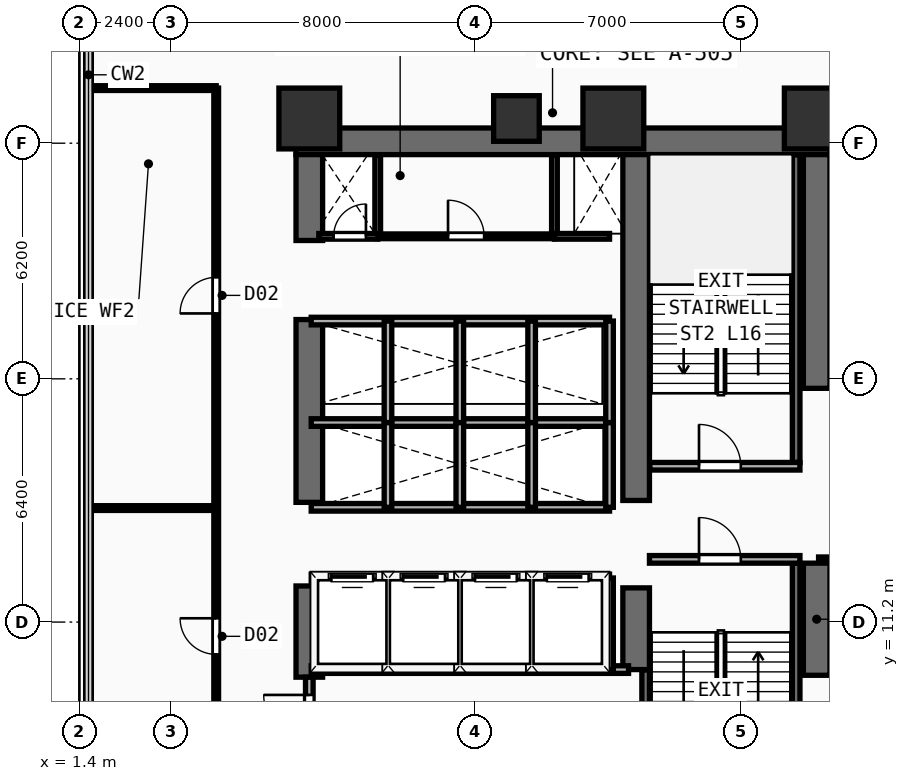
"""IFC4 building model, lengths in metres.
Left out: names, types, materials, properties, quantities, classifications, styles, units other than length and angle.
Written with IfcOpenShell. Run it as: python <this file> out.ifc"""

import sys

from ifc_helpers import new_model, si_unit, direction, frame, frame_2d, origin, origin_2d, place, context, subcontext, project, spatial, rectangle, extrude, element, fill, save


model = new_model("IFC4")
c1 = context("Model", 3, precision=1e-05, world=origin(), true_north=direction((0.0, 1.0)))
c2 = subcontext(c1, "Body", "Model", "MODEL_VIEW")
j1 = project(units=[si_unit("LENGTHUNIT", "METRE"), si_unit("PLANEANGLEUNIT", "RADIAN")], contexts=[c1])
p1 = place(None, origin())
s1 = spatial("IfcSite", under=j1, at=p1, CompositionType="ELEMENT")
p2 = place(p1, origin())
s2 = spatial("IfcBuilding", under=s1, at=p2, CompositionType="ELEMENT")
p3 = place(p2, frame((0.0, 0.0, 63.8)))
s3 = spatial("IfcBuildingStorey", under=s2, at=p3, CompositionType="ELEMENT", Elevation=63.8)
p4 = place(p3, frame((7.1, 23.85, 0.0), z_axis=(0.0, 0.0, 1.0), x_axis=(1.0, 0.0, 0.0)))
e1 = element("IfcWall", 1, at=p4, inside=s3, PredefinedType="SHEAR", context=c2, shape_type="SweptSolid", body=[
    extrude(rectangle(XDim=14.05, YDim=0.7, at=frame_2d((7.025, 0.0))), origin(), (0.0, 0.0, 1.0), 3.54),
])
p5 = place(p3, frame((7.45, 9.75, 0.0), z_axis=(0.0, 0.0, 1.0), x_axis=(0.0, 1.0, 0.0)))
e2 = element("IfcWall", 2, at=p5, inside=s3, PredefinedType="SHEAR", context=c2, shape_type="SweptSolid", body=[
    extrude(rectangle(XDim=2.4, YDim=0.7, at=frame_2d((1.2, 0.0))), origin(), (0.0, 0.0, 1.0), 3.54),
])
p6 = place(p3, frame((7.45, 14.35, 0.0), z_axis=(0.0, 0.0, 1.0), x_axis=(0.0, 1.0, 0.0)))
e3 = element("IfcWall", 3, at=p6, inside=s3, PredefinedType="SHEAR", context=c2, shape_type="SweptSolid", body=[
    extrude(rectangle(XDim=4.81, YDim=0.7, at=frame_2d((2.405, 0.0))), origin(), (0.0, 0.0, 1.0), 3.54),
])
p7 = place(p3, frame((7.45, 21.24, 0.0), z_axis=(0.0, 0.0, 1.0), x_axis=(0.0, 1.0, 0.0)))
e4 = element("IfcWall", 4, at=p7, inside=s3, PredefinedType="SHEAR", context=c2, shape_type="SweptSolid", body=[
    extrude(rectangle(XDim=2.26, YDim=0.7, at=frame_2d((1.13, 0.0))), origin(), (0.0, 0.0, 1.0), 3.54),
])
p8 = place(p3, frame((20.8, 9.8, 0.0), z_axis=(0.0, 0.0, 1.0), x_axis=(0.0, 1.0, 0.0)))
e5 = element("IfcWall", 5, at=p8, inside=s3, PredefinedType="SHEAR", context=c2, shape_type="SweptSolid", body=[
    extrude(rectangle(XDim=2.95, YDim=0.7, at=frame_2d((1.475, 0.0))), origin(), (0.0, 0.0, 1.0), 3.54),
])
p9 = place(p3, frame((20.8, 17.35, 0.0), z_axis=(0.0, 0.0, 1.0), x_axis=(0.0, 1.0, 0.0)))
e6 = element("IfcWall", 6, at=p9, inside=s3, PredefinedType="SHEAR", context=c2, shape_type="SweptSolid", body=[
    extrude(rectangle(XDim=6.15, YDim=0.7, at=frame_2d((3.075, 0.0))), origin(), (0.0, 0.0, 1.0), 3.54),
])
p10 = place(p3, frame((16.05, 9.95, 0.0), z_axis=(0.0, 0.0, 1.0), x_axis=(0.0, 1.0, 0.0)))
e7 = element("IfcWall", 7, at=p10, inside=s3, PredefinedType="SHEAR", context=c2, shape_type="SweptSolid", body=[
    extrude(rectangle(XDim=2.15, YDim=0.7, at=frame_2d((1.075, 0.0))), origin(), (0.0, 0.0, 1.0), 3.54),
])
p11 = place(p3, frame((16.05, 14.4, 0.0), z_axis=(0.0, 0.0, 1.0), x_axis=(0.0, 1.0, 0.0)))
e8 = element("IfcWall", 8, at=p11, inside=s3, PredefinedType="SHEAR", context=c2, shape_type="SweptSolid", body=[
    extrude(rectangle(XDim=9.1, YDim=0.7, at=frame_2d((4.55, 0.0))), origin(), (0.0, 0.0, 1.0), 3.54),
])
for number, where, z_axis, x_axis in (
    (9, (7.45, 24.45, 0.0), (0.0, 0.0, 1.0), (1.0, 0.0, 0.0)),
    (10, (15.45, 24.45, 0.0), (0.0, 0.0, 1.0), (1.0, 0.0, 0.0)),
    (11, (20.75, 24.45, 0.0), (0.0, 0.0, 1.0), (1.0, 0.0, 0.0)),
):
    element("IfcColumn", number, at=place(p3, frame(where, z_axis=z_axis, x_axis=x_axis)), inside=s3, PredefinedType="COLUMN", context=c2, shape_type="SweptSolid", body=[
        extrude(rectangle(XDim=1.6, YDim=1.6, at=origin_2d()), origin(), (0.0, 0.0, 1.0), 3.54),
    ])
p12 = place(p3, frame((12.9, 24.45, 0.0), z_axis=(0.0, 0.0, 1.0), x_axis=(1.0, 0.0, 0.0)))
e12 = element("IfcColumn", 12, at=p12, inside=s3, PredefinedType="COLUMN", context=c2, shape_type="SweptSolid", body=[
    extrude(rectangle(XDim=1.2, YDim=1.2, at=origin_2d()), origin(), (0.0, 0.0, 1.0), 3.54),
])
p13 = place(p3, frame((16.3, 7.36, 0.0), z_axis=(0.0, 0.0, 1.0), x_axis=(0.0, 1.0, 0.0)))
e13 = element("IfcWall", 13, at=p13, inside=s3, PredefinedType="SHEAR", context=c2, shape_type="SweptSolid", body=[
    extrude(rectangle(XDim=2.58, YDim=0.2, at=frame_2d((1.29, 0.0))), origin(), (0.0, 0.0, 1.0), 3.54),
])
p14 = place(p3, frame((20.26, 4.66, 0.0), z_axis=(0.0, 0.0, 1.0), x_axis=(0.0, 1.0, 0.0)))
e14 = element("IfcWall", 14, at=p14, inside=s3, PredefinedType="SHEAR", context=c2, shape_type="SweptSolid", body=[
    extrude(rectangle(XDim=8.09, YDim=0.2, at=frame_2d((4.045, 0.0))), origin(), (0.0, 0.0, 1.0), 3.54),
])
p15 = place(p3, frame((16.4, 12.85, 0.0), z_axis=(0.0, 0.0, 1.0), x_axis=(1.0, 0.0, 0.0)))
e15 = element("IfcWall", 15, at=p15, inside=s3, PredefinedType="PARTITIONING", context=c2, shape_type="SweptSolid", body=[
    extrude(rectangle(XDim=3.96, YDim=0.2, at=frame_2d((1.98, 0.0))), origin(), (0.0, 0.0, 1.0), 3.54),
])
p16 = place(p15, frame((1.304, 0.0, 0.0)))
e16 = element("IfcOpeningElement", 16, at=p16, cuts=e15, PredefinedType="OPENING", context=c2, shape_type="SweptSolid", body=[
    extrude(rectangle(XDim=1.1, YDim=2.2, at=frame_2d((0.55, 1.1))), frame((0.0, 0.11, 0.0), z_axis=(0.0, -1.0, 0.0), x_axis=(1.0, 0.0, 0.0)), (0.0, 0.0, 1.0), 0.22),
])
p17 = place(p3, frame((20.26, 15.4, 0.0), z_axis=(0.0, 0.0, 1.0), x_axis=(0.0, 1.0, 0.0)))
e17 = element("IfcWall", 17, at=p17, inside=s3, PredefinedType="SHEAR", context=c2, shape_type="SweptSolid", body=[
    extrude(rectangle(XDim=8.09, YDim=0.2, at=frame_2d((4.045, 0.0))), origin(), (0.0, 0.0, 1.0), 3.54),
])
p18 = place(p3, frame((16.41, 15.3, 0.0), z_axis=(0.0, 0.0, 1.0), x_axis=(1.0, 0.0, 0.0)))
e18 = element("IfcWall", 18, at=p18, inside=s3, PredefinedType="PARTITIONING", context=c2, shape_type="SweptSolid", body=[
    extrude(rectangle(XDim=3.95, YDim=0.2, at=frame_2d((1.975, 0.0))), origin(), (0.0, 0.0, 1.0), 3.54),
])
p19 = place(p18, frame((1.294, 0.0, 0.0)))
e19 = element("IfcOpeningElement", 19, at=p19, cuts=e18, PredefinedType="OPENING", context=c2, shape_type="SweptSolid", body=[
    extrude(rectangle(XDim=1.1, YDim=2.2, at=frame_2d((0.55, 1.1))), frame((0.0, 0.11, 0.0), z_axis=(0.0, -1.0, 0.0), x_axis=(1.0, 0.0, 0.0)), (0.0, 0.0, 1.0), 0.22),
])
p20 = place(p3, frame((7.5, 9.95, 0.0), z_axis=(0.0, 0.0, 1.0), x_axis=(1.0, 0.0, 0.0)))
e20 = element("IfcWall", 20, at=p20, inside=s3, PredefinedType="PARTITIONING", context=c2, shape_type="SweptSolid", body=[
    extrude(rectangle(XDim=8.35, YDim=0.2, at=frame_2d((4.175, 0.0))), origin(), (0.0, 0.0, 1.0), 3.54),
])
p21 = place(p3, frame((7.45, 7.45, 0.0), z_axis=(0.0, 0.0, 1.0), x_axis=(0.0, 1.0, 0.0)))
e21 = element("IfcWall", 21, at=p21, inside=s3, PredefinedType="PARTITIONING", context=c2, shape_type="SweptSolid", body=[
    extrude(rectangle(XDim=2.3, YDim=0.2, at=frame_2d((1.15, 0.0))), origin(), (0.0, 0.0, 1.0), 2.52),
])
p22 = place(p21, frame((0.633, 0.0, 0.0)))
e22 = element("IfcOpeningElement", 22, at=p22, cuts=e21, PredefinedType="OPENING", context=c2, shape_type="SweptSolid", body=[
    extrude(rectangle(XDim=1.2, YDim=2.25, at=frame_2d((0.6, 1.125))), frame((0.0, 0.11, 0.0), z_axis=(0.0, -1.0, 0.0), x_axis=(1.0, 0.0, 0.0)), (0.0, 0.0, 1.0), 0.22),
])
p23 = place(p3, frame((7.5, 12.36, 0.0), z_axis=(0.0, 0.0, 1.0), x_axis=(1.0, 0.0, 0.0)))
e23 = element("IfcWall", 23, at=p23, inside=s3, PredefinedType="PARTITIONING", context=c2, shape_type="SweptSolid", body=[
    extrude(rectangle(XDim=7.85, YDim=0.2, at=frame_2d((3.925, 0.0))), origin(), (0.0, 0.0, 1.0), 3.54),
])
p24 = place(p23, frame((0.53, 0.0, 0.0)))
e24 = element("IfcOpeningElement", 24, at=p24, cuts=e23, PredefinedType="OPENING", context=c2, shape_type="SweptSolid", body=[
    extrude(rectangle(XDim=1.1, YDim=2.2, at=frame_2d((0.55, 1.1))), frame((0.0, 0.11, 0.0), z_axis=(0.0, -1.0, 0.0), x_axis=(1.0, 0.0, 0.0)), (0.0, 0.0, 1.0), 0.22),
])
p25 = place(p23, frame((2.42, 0.0, 0.0)))
e25 = element("IfcOpeningElement", 25, at=p25, cuts=e23, PredefinedType="OPENING", context=c2, shape_type="SweptSolid", body=[
    extrude(rectangle(XDim=1.1, YDim=2.2, at=frame_2d((0.55, 1.1))), frame((0.0, 0.11, 0.0), z_axis=(0.0, -1.0, 0.0), x_axis=(1.0, 0.0, 0.0)), (0.0, 0.0, 1.0), 0.22),
])
p26 = place(p23, frame((4.31, 0.0, 0.0)))
e26 = element("IfcOpeningElement", 26, at=p26, cuts=e23, PredefinedType="OPENING", context=c2, shape_type="SweptSolid", body=[
    extrude(rectangle(XDim=1.1, YDim=2.2, at=frame_2d((0.55, 1.1))), frame((0.0, 0.11, 0.0), z_axis=(0.0, -1.0, 0.0), x_axis=(1.0, 0.0, 0.0)), (0.0, 0.0, 1.0), 0.22),
])
p27 = place(p23, frame((6.2, 0.0, 0.0)))
e27 = element("IfcOpeningElement", 27, at=p27, cuts=e23, PredefinedType="OPENING", context=c2, shape_type="SweptSolid", body=[
    extrude(rectangle(XDim=1.1, YDim=2.2, at=frame_2d((0.55, 1.1))), frame((0.0, 0.11, 0.0), z_axis=(0.0, -1.0, 0.0), x_axis=(1.0, 0.0, 0.0)), (0.0, 0.0, 1.0), 0.22),
])
for number, where, z_axis, x_axis in (
    (28, (15.35, 9.95, 0.0), (0.0, 0.0, 1.0), (0.0, 1.0, 0.0)),
    (29, (9.52, 9.95, 0.0), (0.0, 0.0, 1.0), (0.0, 1.0, 0.0)),
    (30, (11.41, 9.95, 0.0), (0.0, 0.0, 1.0), (0.0, 1.0, 0.0)),
    (31, (13.3, 9.95, 0.0), (0.0, 0.0, 1.0), (0.0, 1.0, 0.0)),
):
    element("IfcWall", number, at=place(p3, frame(where, z_axis=z_axis, x_axis=x_axis)), inside=s3, PredefinedType="PARTITIONING", context=c2, shape_type="SweptSolid", body=[
        extrude(rectangle(XDim=2.41, YDim=0.2, at=frame_2d((1.205, 0.0))), origin(), (0.0, 0.0, 1.0), 3.54),
    ])
for number, where, z_axis, x_axis in (
    (32, (7.5, 14.22, 0.0), (0.0, 0.0, 1.0), (1.0, 0.0, 0.0)),
    (33, (7.5, 16.45, 0.0), (0.0, 0.0, 1.0), (1.0, 0.0, 0.0)),
):
    element("IfcWall", number, at=place(p3, frame(where, z_axis=z_axis, x_axis=x_axis)), inside=s3, PredefinedType="PARTITIONING", context=c2, shape_type="SweptSolid", body=[
        extrude(rectangle(XDim=7.85, YDim=0.2, at=frame_2d((3.925, 0.0))), origin(), (0.0, 0.0, 1.0), 3.54),
    ])
for number, where, z_axis, x_axis in (
    (34, (15.35, 14.22, 0.0), (0.0, 0.0, 1.0), (0.0, 1.0, 0.0)),
    (35, (9.52, 14.22, 0.0), (0.0, 0.0, 1.0), (0.0, 1.0, 0.0)),
    (36, (11.41, 14.22, 0.0), (0.0, 0.0, 1.0), (0.0, 1.0, 0.0)),
    (37, (13.3, 14.22, 0.0), (0.0, 0.0, 1.0), (0.0, 1.0, 0.0)),
):
    element("IfcWall", number, at=place(p3, frame(where, z_axis=z_axis, x_axis=x_axis)), inside=s3, PredefinedType="PARTITIONING", context=c2, shape_type="SweptSolid", body=[
        extrude(rectangle(XDim=2.23, YDim=0.2, at=frame_2d((1.115, 0.0))), origin(), (0.0, 0.0, 1.0), 3.54),
    ])
p28 = place(p3, frame((7.5, 19.12, 0.0), z_axis=(0.0, 0.0, 1.0), x_axis=(1.0, 0.0, 0.0)))
e38 = element("IfcWall", 38, at=p28, inside=s3, PredefinedType="PARTITIONING", context=c2, shape_type="SweptSolid", body=[
    extrude(rectangle(XDim=7.85, YDim=0.2, at=frame_2d((3.925, 0.0))), origin(), (0.0, 0.0, 1.0), 3.54),
])
for number, where, z_axis, x_axis in (
    (39, (15.35, 16.45, 0.0), (0.0, 0.0, 1.0), (0.0, 1.0, 0.0)),
    (40, (9.52, 16.45, 0.0), (0.0, 0.0, 1.0), (0.0, 1.0, 0.0)),
    (41, (11.41, 16.45, 0.0), (0.0, 0.0, 1.0), (0.0, 1.0, 0.0)),
    (42, (13.3, 16.45, 0.0), (0.0, 0.0, 1.0), (0.0, 1.0, 0.0)),
):
    element("IfcWall", number, at=place(p3, frame(where, z_axis=z_axis, x_axis=x_axis)), inside=s3, PredefinedType="PARTITIONING", context=c2, shape_type="SweptSolid", body=[
        extrude(rectangle(XDim=2.67, YDim=0.2, at=frame_2d((1.335, 0.0))), origin(), (0.0, 0.0, 1.0), 3.54),
    ])
for number, where, z_axis, x_axis in (
    (43, (9.25, 21.35, 0.0), (0.0, 0.0, 1.0), (0.0, 1.0, 0.0)),
    (44, (13.9, 21.35, 0.0), (0.0, 0.0, 1.0), (0.0, 1.0, 0.0)),
):
    element("IfcWall", number, at=place(p3, frame(where, z_axis=z_axis, x_axis=x_axis)), inside=s3, PredefinedType="PARTITIONING", context=c2, shape_type="SweptSolid", body=[
        extrude(rectangle(XDim=2.13, YDim=0.15, at=frame_2d((1.065, 0.0))), origin(), (0.0, 0.0, 1.0), 3.54),
    ])
p29 = place(p3, frame((7.7, 21.35, 0.0), z_axis=(0.0, 0.0, 1.0), x_axis=(1.0, 0.0, 0.0)))
e45 = element("IfcWall", 45, at=p29, inside=s3, PredefinedType="PARTITIONING", context=c2, shape_type="SweptSolid", body=[
    extrude(rectangle(XDim=1.55, YDim=0.15, at=frame_2d((0.775, 0.0))), origin(), (0.0, 0.0, 1.0), 3.54),
])
p30 = place(p29, frame((0.39, 0.0, 0.0)))
e46 = element("IfcOpeningElement", 46, at=p30, cuts=e45, PredefinedType="OPENING", context=c2, shape_type="SweptSolid", body=[
    extrude(rectangle(XDim=0.85, YDim=2.15, at=frame_2d((0.425, 1.075))), frame((0.0, 0.085, 0.0), z_axis=(0.0, -1.0, 0.0), x_axis=(1.0, 0.0, 0.0)), (0.0, 0.0, 1.0), 0.17),
])
p31 = place(p3, frame((13.9, 21.35, 0.0), z_axis=(0.0, 0.0, 1.0), x_axis=(1.0, 0.0, 0.0)))
e47 = element("IfcWall", 47, at=p31, inside=s3, PredefinedType="PARTITIONING", context=c2, shape_type="SweptSolid", body=[
    extrude(rectangle(XDim=1.45, YDim=0.15, at=frame_2d((0.725, 0.0))), origin(), (0.0, 0.0, 1.0), 3.54),
])
p32 = place(p3, frame((9.25, 21.35, 0.0), z_axis=(0.0, 0.0, 1.0), x_axis=(1.0, 0.0, 0.0)))
e48 = element("IfcWall", 48, at=p32, inside=s3, PredefinedType="PARTITIONING", context=c2, shape_type="SweptSolid", body=[
    extrude(rectangle(XDim=4.65, YDim=0.125, at=frame_2d((2.325, 0.0))), origin(), (0.0, 0.0, 1.0), 3.54),
])
p33 = place(p32, frame((1.85, 0.0, 0.0)))
e49 = element("IfcOpeningElement", 49, at=p33, cuts=e48, PredefinedType="OPENING", context=c2, shape_type="SweptSolid", body=[
    extrude(rectangle(XDim=0.95, YDim=2.15, at=frame_2d((0.475, 1.075))), frame((0.0, 0.073, 0.0), z_axis=(0.0, -1.0, 0.0), x_axis=(1.0, 0.0, 0.0)), (0.0, 0.0, 1.0), 0.145),
])
p34 = place(p3, frame((5.0, 7.5, 0.0), z_axis=(0.0, 0.0, 1.0), x_axis=(0.0, 1.0, 0.0)))
e50 = element("IfcWall", 50, at=p34, inside=s3, PredefinedType="PARTITIONING", context=c2, shape_type="SweptSolid", body=[
    extrude(rectangle(XDim=17.75, YDim=0.125, at=frame_2d((8.875, 0.0))), origin(), (0.0, 0.0, 1.0), 3.54),
])
p35 = place(p34, frame((2.85, 0.0, 0.0)))
e51 = element("IfcOpeningElement", 51, at=p35, cuts=e50, PredefinedType="OPENING", context=c2, shape_type="SweptSolid", body=[
    extrude(rectangle(XDim=0.95, YDim=2.15, at=frame_2d((0.475, 1.075))), frame((0.0, 0.073, 0.0), z_axis=(0.0, -1.0, 0.0), x_axis=(1.0, 0.0, 0.0)), (0.0, 0.0, 1.0), 0.145),
])
p36 = place(p34, frame((11.821, 0.0, 0.0)))
e52 = element("IfcOpeningElement", 52, at=p36, cuts=e50, PredefinedType="OPENING", context=c2, shape_type="SweptSolid", body=[
    extrude(rectangle(XDim=0.95, YDim=2.15, at=frame_2d((0.475, 1.075))), frame((0.0, 0.073, 0.0), z_axis=(0.0, -1.0, 0.0), x_axis=(1.0, 0.0, 0.0)), (0.0, 0.0, 1.0), 0.145),
])
for number, where, z_axis, x_axis in (
    (53, (1.64, 25.25, 0.0), (0.0, 0.0, 1.0), (1.0, 0.0, 0.0)),
    (54, (1.64, 14.2, 0.0), (0.0, 0.0, 1.0), (1.0, 0.0, 0.0)),
):
    element("IfcWall", number, at=place(p3, frame(where, z_axis=z_axis, x_axis=x_axis)), inside=s3, PredefinedType="PARTITIONING", context=c2, shape_type="SweptSolid", body=[
        extrude(rectangle(XDim=3.36, YDim=0.125, at=frame_2d((1.68, 0.0))), origin(), (0.0, 0.0, 1.0), 3.54),
    ])
p37 = place(p3, frame((20.85, 12.85, 0.0), z_axis=(0.0, 0.0, 1.0), x_axis=(1.0, 0.0, 0.0)))
e55 = element("IfcWall", 55, at=p37, inside=s3, PredefinedType="PARTITIONING", context=c2, shape_type="SweptSolid", body=[
    extrude(rectangle(XDim=7.05, YDim=0.125, at=frame_2d((3.525, 0.0))), origin(), (0.0, 0.0, 1.0), 3.54),
])
p38 = place(p37, frame((2.8, 0.0, 0.0)))
e56 = element("IfcOpeningElement", 56, at=p38, cuts=e55, PredefinedType="OPENING", context=c2, shape_type="SweptSolid", body=[
    extrude(rectangle(XDim=0.95, YDim=2.15, at=frame_2d((0.475, 1.075))), frame((0.0, 0.073, 0.0), z_axis=(0.0, -1.0, 0.0), x_axis=(1.0, 0.0, 0.0)), (0.0, 0.0, 1.0), 0.145),
])
p39 = place(p16, frame((1.1, 0.0, 0.0), z_axis=(0.0, 0.0, 1.0), x_axis=(-1.0, 0.0, 0.0)))
e57 = element("IfcDoor", 57, at=p39, inside=s3, OperationType="SINGLE_SWING_RIGHT", PredefinedType="DOOR", context=c2, shape_type="SweptSolid", body=[
    extrude(rectangle(XDim=1.1, YDim=2.2, at=frame_2d((0.55, 1.1))), frame((0.0, 0.025, 0.0), z_axis=(0.0, -1.0, 0.0), x_axis=(1.0, 0.0, 0.0)), (0.0, 0.0, 1.0), 0.05),
])
fill(e16, e57)
p40 = place(p19, origin())
e58 = element("IfcDoor", 58, at=p40, inside=s3, OperationType="SINGLE_SWING_LEFT", PredefinedType="DOOR", context=c2, shape_type="SweptSolid", body=[
    extrude(rectangle(XDim=1.1, YDim=2.2, at=frame_2d((0.55, 1.1))), frame((0.0, 0.025, 0.0), z_axis=(0.0, -1.0, 0.0), x_axis=(1.0, 0.0, 0.0)), (0.0, 0.0, 1.0), 0.05),
])
fill(e19, e58)
p41 = place(p22, frame((1.2, 0.0, 0.0), z_axis=(0.0, 0.0, 1.0), x_axis=(-1.0, 0.0, 0.0)))
e59 = element("IfcDoor", 59, at=p41, inside=s3, OperationType="SINGLE_SWING_LEFT", PredefinedType="DOOR", context=c2, shape_type="SweptSolid", body=[
    extrude(rectangle(XDim=1.2, YDim=2.25, at=frame_2d((0.6, 1.125))), frame((0.0, 0.025, 0.0), z_axis=(0.0, -1.0, 0.0), x_axis=(1.0, 0.0, 0.0)), (0.0, 0.0, 1.0), 0.05),
])
fill(e22, e59)
p42 = place(p24, origin())
e60 = element("IfcDoor", 60, at=p42, inside=s3, OperationType="SLIDING_TO_LEFT", PredefinedType="DOOR", context=c2, shape_type="SweptSolid", body=[
    extrude(rectangle(XDim=1.1, YDim=2.2, at=frame_2d((0.55, 1.1))), frame((0.0, 0.025, 0.0), z_axis=(0.0, -1.0, 0.0), x_axis=(1.0, 0.0, 0.0)), (0.0, 0.0, 1.0), 0.05),
])
fill(e24, e60)
p43 = place(p25, origin())
e61 = element("IfcDoor", 61, at=p43, inside=s3, OperationType="SLIDING_TO_LEFT", PredefinedType="DOOR", context=c2, shape_type="SweptSolid", body=[
    extrude(rectangle(XDim=1.1, YDim=2.2, at=frame_2d((0.55, 1.1))), frame((0.0, 0.025, 0.0), z_axis=(0.0, -1.0, 0.0), x_axis=(1.0, 0.0, 0.0)), (0.0, 0.0, 1.0), 0.05),
])
fill(e25, e61)
p44 = place(p26, origin())
e62 = element("IfcDoor", 62, at=p44, inside=s3, OperationType="SLIDING_TO_LEFT", PredefinedType="DOOR", context=c2, shape_type="SweptSolid", body=[
    extrude(rectangle(XDim=1.1, YDim=2.2, at=frame_2d((0.55, 1.1))), frame((0.0, 0.025, 0.0), z_axis=(0.0, -1.0, 0.0), x_axis=(1.0, 0.0, 0.0)), (0.0, 0.0, 1.0), 0.05),
])
fill(e26, e62)
p45 = place(p27, origin())
e63 = element("IfcDoor", 63, at=p45, inside=s3, OperationType="SLIDING_TO_LEFT", PredefinedType="DOOR", context=c2, shape_type="SweptSolid", body=[
    extrude(rectangle(XDim=1.1, YDim=2.2, at=frame_2d((0.55, 1.1))), frame((0.0, 0.025, 0.0), z_axis=(0.0, -1.0, 0.0), x_axis=(1.0, 0.0, 0.0)), (0.0, 0.0, 1.0), 0.05),
])
fill(e27, e63)
p46 = place(p30, origin())
e64 = element("IfcDoor", 64, at=p46, inside=s3, OperationType="SINGLE_SWING_RIGHT", PredefinedType="DOOR", context=c2, shape_type="SweptSolid", body=[
    extrude(rectangle(XDim=0.85, YDim=2.15, at=frame_2d((0.425, 1.075))), frame((0.0, 0.025, 0.0), z_axis=(0.0, -1.0, 0.0), x_axis=(1.0, 0.0, 0.0)), (0.0, 0.0, 1.0), 0.05),
])
fill(e46, e64)
p47 = place(p33, origin())
e65 = element("IfcDoor", 65, at=p47, inside=s3, OperationType="SINGLE_SWING_LEFT", PredefinedType="DOOR", context=c2, shape_type="SweptSolid", body=[
    extrude(rectangle(XDim=0.95, YDim=2.15, at=frame_2d((0.475, 1.075))), frame((0.0, 0.025, 0.0), z_axis=(0.0, -1.0, 0.0), x_axis=(1.0, 0.0, 0.0)), (0.0, 0.0, 1.0), 0.05),
])
fill(e49, e65)
p48 = place(p35, origin())
e66 = element("IfcDoor", 66, at=p48, inside=s3, OperationType="SINGLE_SWING_RIGHT", PredefinedType="DOOR", context=c2, shape_type="SweptSolid", body=[
    extrude(rectangle(XDim=0.95, YDim=2.15, at=frame_2d((0.475, 1.075))), frame((0.0, 0.025, 0.0), z_axis=(0.0, -1.0, 0.0), x_axis=(1.0, 0.0, 0.0)), (0.0, 0.0, 1.0), 0.05),
])
fill(e51, e66)
p49 = place(p36, origin())
e67 = element("IfcDoor", 67, at=p49, inside=s3, OperationType="SINGLE_SWING_LEFT", PredefinedType="DOOR", context=c2, shape_type="SweptSolid", body=[
    extrude(rectangle(XDim=0.95, YDim=2.15, at=frame_2d((0.475, 1.075))), frame((0.0, 0.025, 0.0), z_axis=(0.0, -1.0, 0.0), x_axis=(1.0, 0.0, 0.0)), (0.0, 0.0, 1.0), 0.05),
])
fill(e52, e67)
save(model, sys.argv[1])
